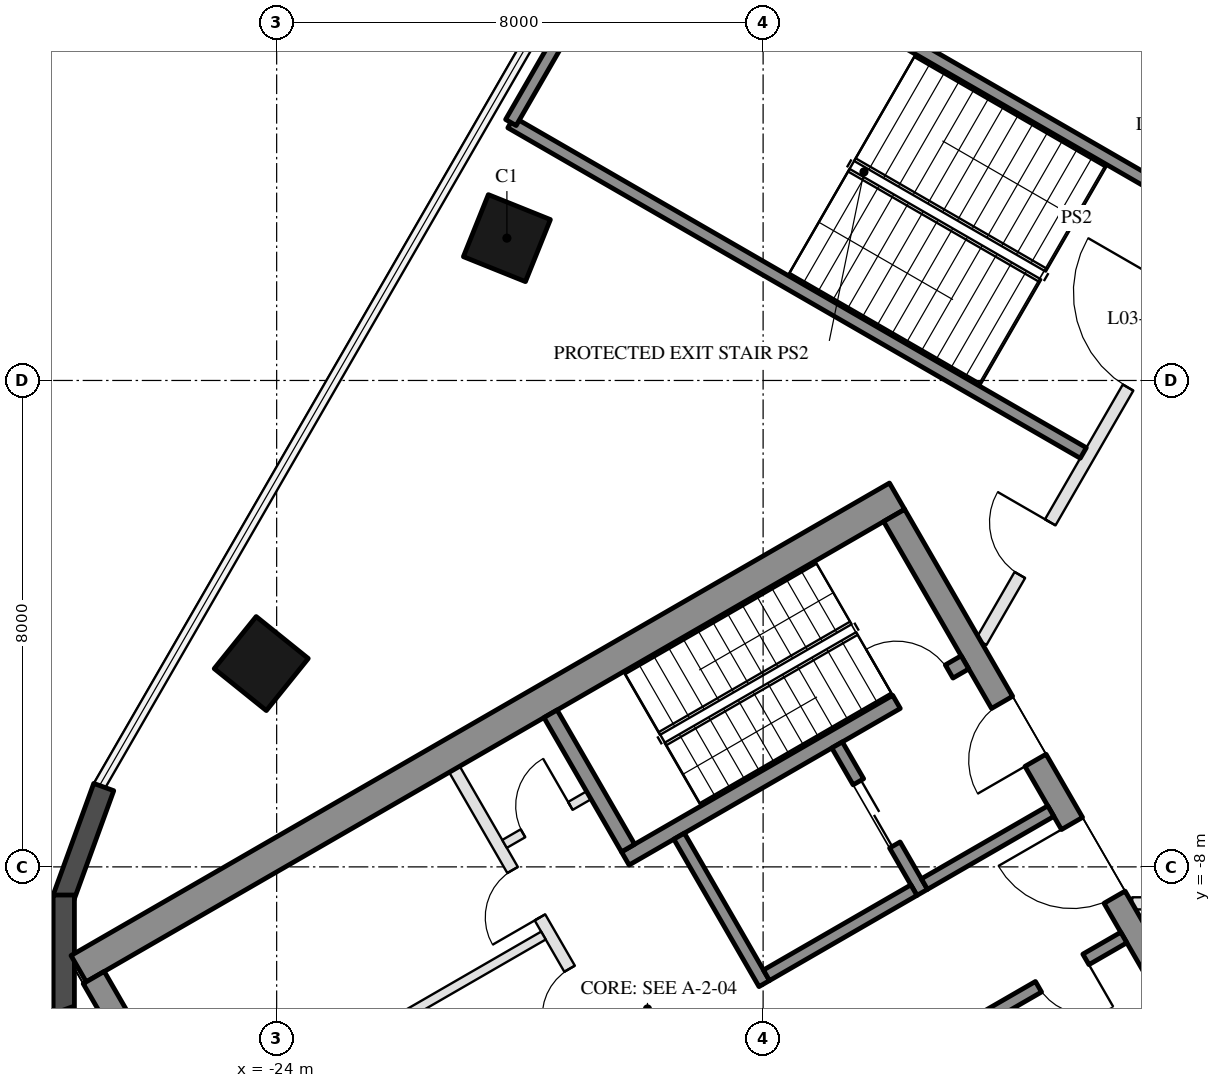
"""IFC4 building model, lengths in metres.
Left out: names, types, materials, properties, quantities, classifications, styles, units other than length and angle.
Written with IfcOpenShell. Run it as: python <this file> out.ifc"""

import sys

from ifc_helpers import new_model, si_unit, direction, frame, frame_2d, origin, origin_2d, place, context, subcontext, project, spatial, rectangle, hollow_rectangle, extrude, boolean, halfspace, element, fill, save


model = new_model("IFC4")
c1 = context("Model", 3, precision=1e-05, world=origin(), true_north=direction((0.0, 1.0)))
c2 = subcontext(c1, "Body", "Model", "MODEL_VIEW")
j1 = project(units=[si_unit("LENGTHUNIT", "METRE"), si_unit("PLANEANGLEUNIT", "RADIAN")], contexts=[c1])
p1 = place(None, origin())
s1 = spatial("IfcSite", under=j1, at=p1, CompositionType="ELEMENT")
p2 = place(p1, origin())
s2 = spatial("IfcBuilding", under=s1, at=p2, CompositionType="ELEMENT")
p3 = place(p2, frame((0.0, 0.0, 23.5)))
s3 = spatial("IfcBuildingStorey", under=s2, at=p3, CompositionType="ELEMENT", Elevation=23.5)
p4 = place(p3, frame((-20.214, 2.341, 0.0), z_axis=(0.055770669369, -0.007946345373, 0.998411983118), x_axis=(-0.499656252381, -0.865968742186, 0.021018254285)))
e1 = element("IfcColumn", 1, at=p4, inside=s3, PredefinedType="COLUMN", context=c2, shape_type="SweptSolid", body=[
    boolean("DIFFERENCE", boolean("DIFFERENCE", extrude(hollow_rectangle(XDim=1.1, YDim=1.1, WallThickness=0.05, at=origin_2d()), origin(), (0.0, 0.0, 1.0), 5.008), halfspace(frame((0.0, 0.0, 0.014), z_axis=(0.0, 0.0, 1.0), x_axis=(1.0, 0.0, 0.0)), True)), halfspace(frame((0.0, 0.0, 4.997), z_axis=(0.0, 0.0, 1.0), x_axis=(1.0, 0.0, 0.0)), False)),
])
p5 = place(p3, frame((-24.253, -4.656, 0.0), z_axis=(0.066256812747, 0.010279549625, 0.997749650776), x_axis=(-0.498832862409, -0.865677791145, 0.042044468106)))
e2 = element("IfcColumn", 2, at=p5, inside=s3, PredefinedType="COLUMN", context=c2, shape_type="SweptSolid", body=[
    boolean("DIFFERENCE", boolean("DIFFERENCE", extrude(hollow_rectangle(XDim=1.1, YDim=1.1, WallThickness=0.05, at=origin_2d()), origin(), (0.0, 0.0, 1.0), 5.011), halfspace(frame((0.0, 0.0, 0.017), z_axis=(0.0, 0.0, 1.0), x_axis=(1.0, 0.0, 0.0)), True)), halfspace(frame((0.0, 0.0, 4.999), z_axis=(0.0, 0.0, 1.0), x_axis=(1.0, 0.0, 0.0)), False)),
])
for number, where, z_axis, x_axis in (
    (3, (-26.844, -6.687, 0.0), (0.0, 0.0, 1.0), (-0.342, -0.94, 0.0)),
    (4, (-27.501, -8.463, 0.0), (0.0, 0.0, 1.0), (0.0, -1.0, 0.0)),
    (5, (-27.512, -10.357, 0.0), (0.0, 0.0, 1.0), (0.342, -0.94, 0.0)),
):
    element("IfcWall", number, at=place(p3, frame(where, z_axis=z_axis, x_axis=x_axis)), inside=s3, PredefinedType="SOLIDWALL", context=c2, shape_type="SweptSolid", body=[
        extrude(rectangle(XDim=1.954, YDim=0.35, at=frame_2d((0.977, 0.0))), origin(), (0.0, 0.0, 1.0), 4.7),
    ])
p6 = place(p3, frame((-13.797, -1.903, 0.0), z_axis=(0.0, 0.0, 1.0), x_axis=(-0.866025760136, -0.499999382781, 0.0)))
e6 = element("IfcWall", 6, at=p6, inside=s3, PredefinedType="SHEAR", context=c2, shape_type="SweptSolid", body=[
    extrude(rectangle(XDim=15.542, YDim=0.5, at=frame_2d((7.771, 0.0))), origin(), (0.0, 0.0, 1.0), 4.7),
])
p7 = place(p3, frame((-13.845, -2.22, 0.0), z_axis=(0.0, 0.0, 1.0), x_axis=(0.500004234368, -0.866022959057, 0.0)))
e7 = element("IfcWall", 7, at=p7, inside=s3, PredefinedType="SHEAR", context=c2, shape_type="SweptSolid", body=[
    extrude(rectangle(XDim=10.0, YDim=0.4, at=frame_2d((5.0, 0.0))), origin(), (0.0, 0.0, 1.0), 4.7),
])
p8 = place(p7, frame((3.55, 0.0, 0.0)))
e8 = element("IfcOpeningElement", 8, at=p8, cuts=e7, PredefinedType="OPENING", context=c2, shape_type="SweptSolid", body=[
    extrude(rectangle(XDim=1.1, YDim=2.1, at=frame_2d((0.55, 1.05))), frame((0.0, 0.21, 0.0), z_axis=(0.0, -1.0, 0.0), x_axis=(1.0, 0.0, 0.0)), (0.0, 0.0, 1.0), 0.42),
])
p9 = place(p7, frame((5.85, 0.0, 0.0)))
e9 = element("IfcOpeningElement", 9, at=p9, cuts=e7, PredefinedType="OPENING", context=c2, shape_type="SweptSolid", body=[
    extrude(rectangle(XDim=1.4, YDim=2.1, at=frame_2d((0.7, 1.05))), frame((0.0, 0.21, 0.0), z_axis=(0.0, -1.0, 0.0), x_axis=(1.0, 0.0, 0.0)), (0.0, 0.0, 1.0), 0.42),
])
p10 = place(p3, frame((-27.009, -9.82, 0.0), z_axis=(0.0, 0.0, 1.0), x_axis=(0.499977295307, -0.866038511948, 0.0)))
e10 = element("IfcWall", 10, at=p10, inside=s3, PredefinedType="SHEAR", context=c2, shape_type="SweptSolid", body=[
    extrude(rectangle(XDim=3.4, YDim=0.4, at=frame_2d((1.7, 0.0))), origin(), (0.0, 0.0, 1.0), 4.7),
])
p11 = place(p3, frame((-12.681, -4.636, 0.0), z_axis=(0.0, 0.0, 1.0), x_axis=(-0.866021702275, -0.500006411147, 0.0)))
e11 = element("IfcWall", 11, at=p11, inside=s3, PredefinedType="SHEAR", context=c2, shape_type="SweptSolid", body=[
    extrude(rectangle(XDim=6.45, YDim=0.25, at=frame_2d((3.225, 0.0))), origin(), (0.0, 0.0, 1.0), 4.7),
])
p12 = place(p11, frame((0.3, 0.0, 0.0)))
e12 = element("IfcOpeningElement", 12, at=p12, cuts=e11, PredefinedType="OPENING", context=c2, shape_type="SweptSolid", body=[
    extrude(rectangle(XDim=1.0, YDim=2.1, at=frame_2d((0.5, 1.05))), frame((0.0, 0.135, 0.0), z_axis=(0.0, -1.0, 0.0), x_axis=(1.0, 0.0, 0.0)), (0.0, 0.0, 1.0), 0.27),
])
p13 = place(p3, frame((-19.496, -5.482, 0.0), z_axis=(0.0, 0.0, 1.0), x_axis=(0.499990435942, -0.866030925526, 0.0)))
e13 = element("IfcWall", 13, at=p13, inside=s3, PredefinedType="SHEAR", context=c2, shape_type="SweptSolid", body=[
    extrude(rectangle(XDim=2.55, YDim=0.25, at=frame_2d((1.275, 0.0))), origin(), (0.0, 0.0, 1.0), 4.7),
])
p14 = place(p3, frame((-17.381, -7.495, 0.0), z_axis=(0.0, 0.0, 1.0), x_axis=(0.500011755427, -0.866018616679, 0.0)))
e14 = element("IfcWall", 14, at=p14, inside=s3, PredefinedType="SHEAR", context=c2, shape_type="SweptSolid", body=[
    extrude(rectangle(XDim=2.8, YDim=0.2, at=frame_2d((1.4, 0.0))), origin(), (0.0, 0.0, 1.0), 4.7),
])
p15 = place(p3, frame((-14.783, -5.995, 0.0), z_axis=(0.0, 0.0, 1.0), x_axis=(0.49994636267, -0.866056369097, 0.0)))
e15 = element("IfcWall", 15, at=p15, inside=s3, PredefinedType="SHEAR", context=c2, shape_type="SweptSolid", body=[
    extrude(rectangle(XDim=2.8, YDim=0.2, at=frame_2d((1.4, 0.0))), origin(), (0.0, 0.0, 1.0), 4.7),
])
p16 = place(p15, frame((0.7, 0.0, 0.0)))
e16 = element("IfcOpeningElement", 16, at=p16, cuts=e15, PredefinedType="OPENING", context=c2, shape_type="SweptSolid", body=[
    extrude(rectangle(XDim=1.2, YDim=2.1, at=frame_2d((0.6, 1.05))), frame((0.0, 0.11, 0.0), z_axis=(0.0, -1.0, 0.0), x_axis=(1.0, 0.0, 0.0)), (0.0, 0.0, 1.0), 0.22),
])
p17 = place(p3, frame((-13.52, -8.383, 0.0), z_axis=(0.0, 0.0, 1.0), x_axis=(-0.866034573852, -0.49998411664, 0.0)))
e17 = element("IfcWall", 17, at=p17, inside=s3, PredefinedType="SHEAR", context=c2, shape_type="SweptSolid", body=[
    extrude(rectangle(XDim=2.8, YDim=0.2, at=frame_2d((1.4, 0.0))), origin(), (0.0, 0.0, 1.0), 4.7),
])
p18 = place(p3, frame((-11.268, -7.083, 0.0), z_axis=(0.0, 0.0, 1.0), x_axis=(-0.866050077142, -0.499957262057, 0.0)))
e18 = element("IfcWall", 18, at=p18, inside=s3, PredefinedType="SHEAR", context=c2, shape_type="SweptSolid", body=[
    extrude(rectangle(XDim=2.4, YDim=0.2, at=frame_2d((1.2, 0.0))), origin(), (0.0, 0.0, 1.0), 4.7),
])
p19 = place(p3, frame((-10.068, -9.162, 0.0), z_axis=(0.0, 0.0, 1.0), x_axis=(-0.866032725843, -0.499987317609, 0.0)))
e19 = element("IfcWall", 19, at=p19, inside=s3, PredefinedType="SHEAR", context=c2, shape_type="SweptSolid", body=[
    extrude(rectangle(XDim=10.16, YDim=0.2, at=frame_2d((5.08, 0.0))), origin(), (0.0, 0.0, 1.0), 4.7),
])
p20 = place(p19, frame((0.72, 0.0, 0.0)))
e20 = element("IfcOpeningElement", 20, at=p20, cuts=e19, PredefinedType="OPENING", context=c2, shape_type="SweptSolid", body=[
    extrude(rectangle(XDim=0.9, YDim=2.1, at=frame_2d((0.45, 1.05))), frame((0.0, 0.11, 0.0), z_axis=(0.0, -1.0, 0.0), x_axis=(1.0, 0.0, 0.0)), (0.0, 0.0, 1.0), 0.22),
])
p21 = place(p19, frame((5.8, 0.0, 0.0)))
e21 = element("IfcOpeningElement", 21, at=p21, cuts=e19, PredefinedType="OPENING", context=c2, shape_type="SweptSolid", body=[
    extrude(rectangle(XDim=0.9, YDim=2.1, at=frame_2d((0.45, 1.05))), frame((0.0, 0.11, 0.0), z_axis=(0.0, -1.0, 0.0), x_axis=(1.0, 0.0, 0.0)), (0.0, 0.0, 1.0), 0.22),
])
p22 = place(p3, frame((-21.076, -6.395, 0.0), z_axis=(0.0, 0.0, 1.0), x_axis=(0.50001468107, -0.866016927499, 0.0)))
e22 = element("IfcWall", 22, at=p22, inside=s3, PredefinedType="PARTITIONING", context=c2, shape_type="SweptSolid", body=[
    extrude(rectangle(XDim=5.4, YDim=0.2, at=frame_2d((2.7, 0.0))), origin(), (0.0, 0.0, 1.0), 4.7),
])
p23 = place(p22, frame((1.913, 0.0, 0.0)))
e23 = element("IfcOpeningElement", 23, at=p23, cuts=e22, PredefinedType="OPENING", context=c2, shape_type="SweptSolid", body=[
    extrude(rectangle(XDim=0.9, YDim=2.1, at=frame_2d((0.45, 1.05))), frame((0.0, 0.11, 0.0), z_axis=(0.0, -1.0, 0.0), x_axis=(1.0, 0.0, 0.0)), (0.0, 0.0, 1.0), 0.22),
])
p24 = place(p22, frame((3.788, 0.0, 0.0)))
e24 = element("IfcOpeningElement", 24, at=p24, cuts=e22, PredefinedType="OPENING", context=c2, shape_type="SweptSolid", body=[
    extrude(rectangle(XDim=0.9, YDim=2.1, at=frame_2d((0.45, 1.05))), frame((0.0, 0.11, 0.0), z_axis=(0.0, -1.0, 0.0), x_axis=(1.0, 0.0, 0.0)), (0.0, 0.0, 1.0), 0.22),
])
p25 = place(p3, frame((-18.866, -6.822, 0.0), z_axis=(0.0, 0.0, 1.0), x_axis=(-0.866028054938, -0.499995408039, 0.0)))
e25 = element("IfcWall", 25, at=p25, inside=s3, PredefinedType="PARTITIONING", context=c2, shape_type="SweptSolid", body=[
    extrude(rectangle(XDim=1.6, YDim=0.15, at=frame_2d((0.8, 0.0))), origin(), (0.0, 0.0, 1.0), 4.7),
])
p26 = place(p25, frame((0.35, 0.0, 0.0)))
e26 = element("IfcOpeningElement", 26, at=p26, cuts=e25, PredefinedType="OPENING", context=c2, shape_type="SweptSolid", body=[
    extrude(rectangle(XDim=0.9, YDim=2.1, at=frame_2d((0.45, 1.05))), frame((0.0, 0.085, 0.0), z_axis=(0.0, -1.0, 0.0), x_axis=(1.0, 0.0, 0.0)), (0.0, 0.0, 1.0), 0.17),
])
p27 = place(p3, frame((-19.613, -9.13, 0.0), z_axis=(0.0, 0.0, 1.0), x_axis=(-0.866037242061, -0.499979494943, 0.0)))
e27 = element("IfcWall", 27, at=p27, inside=s3, PredefinedType="PARTITIONING", context=c2, shape_type="SweptSolid", body=[
    extrude(rectangle(XDim=6.55, YDim=0.15, at=frame_2d((3.275, 0.0))), origin(), (0.0, 0.0, 1.0), 4.7),
])
p28 = place(p3, frame((-9.93, -8.6, 0.0), z_axis=(0.0, 0.0, 1.0), x_axis=(1.0, 0.0, 0.0)))
e28 = element("IfcWall", 28, at=p28, inside=s3, PredefinedType="PARTITIONING", context=c2, shape_type="SweptSolid", body=[
    extrude(rectangle(XDim=19.861, YDim=0.2, at=frame_2d((9.93, 0.0))), origin(), (0.0, 0.0, 1.0), 3.91),
])
p29 = place(p28, frame((1.734, 0.0, 0.0)))
e29 = element("IfcOpeningElement", 29, at=p29, cuts=e28, PredefinedType="OPENING", context=c2, shape_type="SweptSolid", body=[
    extrude(rectangle(XDim=1.0, YDim=2.1, at=frame_2d((0.5, 1.05))), frame((0.0, 0.11, 0.0), z_axis=(0.0, -1.0, 0.0), x_axis=(1.0, 0.0, 0.0)), (0.0, 0.0, 1.0), 0.22),
])
p30 = place(p28, frame((6.081, 0.0, 0.0)))
e30 = element("IfcOpeningElement", 30, at=p30, cuts=e28, PredefinedType="OPENING", context=c2, shape_type="SweptSolid", body=[
    extrude(rectangle(XDim=1.0, YDim=2.1, at=frame_2d((0.5, 1.05))), frame((0.0, 0.11, 0.0), z_axis=(0.0, -1.0, 0.0), x_axis=(1.0, 0.0, 0.0)), (0.0, 0.0, 1.0), 0.22),
])
p31 = place(p28, frame((10.831, 0.0, 0.0)))
e31 = element("IfcOpeningElement", 31, at=p31, cuts=e28, PredefinedType="OPENING", context=c2, shape_type="SweptSolid", body=[
    extrude(rectangle(XDim=1.0, YDim=2.1, at=frame_2d((0.5, 1.05))), frame((0.0, 0.11, 0.0), z_axis=(0.0, -1.0, 0.0), x_axis=(1.0, 0.0, 0.0)), (0.0, 0.0, 1.0), 0.22),
])
p32 = place(p28, frame((16.278, 0.0, 0.0)))
e32 = element("IfcOpeningElement", 32, at=p32, cuts=e28, PredefinedType="OPENING", context=c2, shape_type="SweptSolid", body=[
    extrude(rectangle(XDim=1.2, YDim=2.1, at=frame_2d((0.6, 1.05))), frame((0.0, 0.11, 0.0), z_axis=(0.0, -1.0, 0.0), x_axis=(1.0, 0.0, 0.0)), (0.0, 0.0, 1.0), 0.22),
])
p33 = place(p3, frame((-16.738, 10.761, 0.0), z_axis=(0.0, 0.0, 1.0), x_axis=(0.866020428917, -0.500008616625, 0.0)))
e33 = element("IfcWall", 33, at=p33, inside=s3, PredefinedType="PARTITIONING", context=c2, shape_type="SweptSolid", body=[
    extrude(rectangle(XDim=11.176, YDim=0.15, at=frame_2d((5.588, 0.0))), origin(), (0.0, 0.0, 1.0), 4.1),
])
p34 = place(p3, frame((-17.948, 8.053, 0.0), z_axis=(0.0, 0.0, 1.0), x_axis=(0.86602026553, -0.500008899612, 0.0)))
e34 = element("IfcWall", 34, at=p34, inside=s3, PredefinedType="SOLIDWALL", context=c2, shape_type="SweptSolid", body=[
    extrude(rectangle(XDim=10.87, YDim=0.2, at=frame_2d((5.435, 0.0))), origin(), (0.0, 0.0, 1.0), 4.7),
])
p35 = place(p3, frame((-20.148, 4.242, 0.0), z_axis=(0.0, 0.0, 1.0), x_axis=(0.866025880615, -0.499999174104, 0.0)))
e35 = element("IfcWall", 35, at=p35, inside=s3, PredefinedType="SOLIDWALL", context=c2, shape_type="SweptSolid", body=[
    extrude(rectangle(XDim=10.87, YDim=0.2, at=frame_2d((5.435, 0.0))), origin(), (0.0, 0.0, 1.0), 4.7),
])
p36 = place(p3, frame((-2.482, 12.9, 0.0), z_axis=(0.0, 0.0, 1.0), x_axis=(-0.50000478328, -0.866022642139, 0.0)))
e36 = element("IfcWall", 36, at=p36, inside=s3, PredefinedType="PARTITIONING", context=c2, shape_type="SweptSolid", body=[
    extrude(rectangle(XDim=19.861, YDim=0.2, at=frame_2d((9.931, 0.0))), origin(), (0.0, 0.0, 1.0), 3.91),
])
p37 = place(p36, frame((13.23, 0.0, 0.0)))
e37 = element("IfcOpeningElement", 37, at=p37, cuts=e36, PredefinedType="OPENING", context=c2, shape_type="SweptSolid", body=[
    extrude(rectangle(XDim=1.8, YDim=2.1, at=frame_2d((0.9, 1.05))), frame((0.0, 0.11, 0.0), z_axis=(0.0, -1.0, 0.0), x_axis=(1.0, 0.0, 0.0)), (0.0, 0.0, 1.0), 0.22),
])
p38 = place(p36, frame((2.234, 0.0, 0.0)))
e38 = element("IfcOpeningElement", 38, at=p38, cuts=e36, PredefinedType="OPENING", context=c2, shape_type="SweptSolid", body=[
    extrude(rectangle(XDim=1.0, YDim=2.1, at=frame_2d((0.5, 1.05))), frame((0.0, 0.11, 0.0), z_axis=(0.0, -1.0, 0.0), x_axis=(1.0, 0.0, 0.0)), (0.0, 0.0, 1.0), 0.22),
])
p39 = place(p36, frame((6.706, 0.0, 0.0)))
e39 = element("IfcOpeningElement", 39, at=p39, cuts=e36, PredefinedType="OPENING", context=c2, shape_type="SweptSolid", body=[
    extrude(rectangle(XDim=1.0, YDim=2.1, at=frame_2d((0.5, 1.05))), frame((0.0, 0.11, 0.0), z_axis=(0.0, -1.0, 0.0), x_axis=(1.0, 0.0, 0.0)), (0.0, 0.0, 1.0), 0.22),
])
p40 = place(p36, frame((9.943, 0.0, 0.0)))
e40 = element("IfcOpeningElement", 40, at=p40, cuts=e36, PredefinedType="OPENING", context=c2, shape_type="SweptSolid", body=[
    extrude(rectangle(XDim=1.0, YDim=2.1, at=frame_2d((0.5, 1.05))), frame((0.0, 0.11, 0.0), z_axis=(0.0, -1.0, 0.0), x_axis=(1.0, 0.0, 0.0)), (0.0, 0.0, 1.0), 0.22),
])
p41 = place(p36, frame((17.59, 0.0, 0.0)))
e41 = element("IfcOpeningElement", 41, at=p41, cuts=e36, PredefinedType="OPENING", context=c2, shape_type="SweptSolid", body=[
    extrude(rectangle(XDim=1.0, YDim=2.1, at=frame_2d((0.5, 1.05))), frame((0.0, 0.11, 0.0), z_axis=(0.0, -1.0, 0.0), x_axis=(1.0, 0.0, 0.0)), (0.0, 0.0, 1.0), 0.22),
])
p42 = place(p3, frame((-17.948, 8.053, 0.0), z_axis=(0.0, 0.0, 1.0), x_axis=(-0.50002983664, -0.866008176907, 0.0)))
e42 = element("IfcWall", 42, at=p42, inside=s3, PredefinedType="SOLIDWALL", context=c2, shape_type="SweptSolid", body=[
    extrude(rectangle(XDim=4.4, YDim=0.2, at=frame_2d((2.2, 0.0))), origin(), (0.0, 0.0, 1.0), 4.7),
])
p43 = place(p16, origin())
e43 = element("IfcDoor", 43, at=p43, inside=s3, OperationType="DOUBLE_DOOR_SLIDING", PredefinedType="DOOR", context=c2, shape_type="SweptSolid", body=[
    extrude(rectangle(XDim=1.2, YDim=2.1, at=frame_2d((0.6, 1.05))), frame((0.0, 0.025, 0.0), z_axis=(0.0, -1.0, 0.0), x_axis=(1.0, 0.0, 0.0)), (0.0, 0.0, 1.0), 0.05),
])
fill(e16, e43)
p44 = place(p26, frame((0.9, 0.0, 0.0), z_axis=(0.0, 0.0, 1.0), x_axis=(-1.0, 0.0, 0.0)))
e44 = element("IfcDoor", 44, at=p44, inside=s3, OperationType="SINGLE_SWING_RIGHT", PredefinedType="DOOR", context=c2, shape_type="SweptSolid", body=[
    extrude(rectangle(XDim=0.9, YDim=2.1, at=frame_2d((0.45, 1.05))), frame((0.0, 0.025, 0.0), z_axis=(0.0, -1.0, 0.0), x_axis=(1.0, 0.0, 0.0)), (0.0, 0.0, 1.0), 0.05),
])
fill(e26, e44)
p45 = place(p20, origin())
e45 = element("IfcDoor", 45, at=p45, inside=s3, OperationType="SINGLE_SWING_LEFT", PredefinedType="DOOR", context=c2, shape_type="SweptSolid", body=[
    extrude(rectangle(XDim=0.9, YDim=2.1, at=frame_2d((0.45, 1.05))), frame((0.0, 0.025, 0.0), z_axis=(0.0, -1.0, 0.0), x_axis=(1.0, 0.0, 0.0)), (0.0, 0.0, 1.0), 0.05),
])
fill(e20, e45)
p46 = place(p23, frame((0.9, 0.0, 0.0), z_axis=(0.0, 0.0, 1.0), x_axis=(-1.0, 0.0, 0.0)))
e46 = element("IfcDoor", 46, at=p46, inside=s3, OperationType="SINGLE_SWING_LEFT", PredefinedType="DOOR", context=c2, shape_type="SweptSolid", body=[
    extrude(rectangle(XDim=0.9, YDim=2.1, at=frame_2d((0.45, 1.05))), frame((0.0, 0.025, 0.0), z_axis=(0.0, -1.0, 0.0), x_axis=(1.0, 0.0, 0.0)), (0.0, 0.0, 1.0), 0.05),
])
fill(e23, e46)
p47 = place(p24, frame((0.9, 0.0, 0.0), z_axis=(0.0, 0.0, 1.0), x_axis=(-1.0, 0.0, 0.0)))
e47 = element("IfcDoor", 47, at=p47, inside=s3, OperationType="SINGLE_SWING_LEFT", PredefinedType="DOOR", context=c2, shape_type="SweptSolid", body=[
    extrude(rectangle(XDim=0.9, YDim=2.1, at=frame_2d((0.45, 1.05))), frame((0.0, 0.025, 0.0), z_axis=(0.0, -1.0, 0.0), x_axis=(1.0, 0.0, 0.0)), (0.0, 0.0, 1.0), 0.05),
])
fill(e24, e47)
p48 = place(p8, frame((1.1, 0.0, 0.0), z_axis=(0.0, 0.0, 1.0), x_axis=(-1.0, 0.0, 0.0)))
e48 = element("IfcDoor", 48, at=p48, inside=s3, OperationType="SINGLE_SWING_LEFT", PredefinedType="DOOR", context=c2, shape_type="SweptSolid", body=[
    extrude(rectangle(XDim=1.1, YDim=2.1, at=frame_2d((0.55, 1.05))), frame((0.0, 0.025, 0.0), z_axis=(0.0, -1.0, 0.0), x_axis=(1.0, 0.0, 0.0)), (0.0, 0.0, 1.0), 0.05),
])
fill(e8, e48)
p49 = place(p9, frame((1.4, 0.0, 0.0), z_axis=(0.0, 0.0, 1.0), x_axis=(-1.0, 0.0, 0.0)))
e49 = element("IfcDoor", 49, at=p49, inside=s3, OperationType="DOUBLE_DOOR_SINGLE_SWING", PredefinedType="DOOR", context=c2, shape_type="SweptSolid", body=[
    extrude(rectangle(XDim=1.4, YDim=2.1, at=frame_2d((0.7, 1.05))), frame((0.0, 0.025, 0.0), z_axis=(0.0, -1.0, 0.0), x_axis=(1.0, 0.0, 0.0)), (0.0, 0.0, 1.0), 0.05),
])
fill(e9, e49)
p50 = place(p12, frame((1.0, 0.0, 0.0), z_axis=(0.0, 0.0, 1.0), x_axis=(-1.0, 0.0, 0.0)))
e50 = element("IfcDoor", 50, at=p50, inside=s3, OperationType="SINGLE_SWING_LEFT", PredefinedType="DOOR", context=c2, shape_type="SweptSolid", body=[
    extrude(rectangle(XDim=1.0, YDim=2.1, at=frame_2d((0.5, 1.05))), frame((0.0, 0.025, 0.0), z_axis=(0.0, -1.0, 0.0), x_axis=(1.0, 0.0, 0.0)), (0.0, 0.0, 1.0), 0.05),
])
fill(e12, e50)
p51 = place(p37, frame((1.8, 0.0, 0.0), z_axis=(0.0, 0.0, 1.0), x_axis=(-1.0, 0.0, 0.0)))
e51 = element("IfcDoor", 51, at=p51, inside=s3, OperationType="DOUBLE_DOOR_SINGLE_SWING", PredefinedType="DOOR", context=c2, shape_type="SweptSolid", body=[
    extrude(rectangle(XDim=1.8, YDim=2.1, at=frame_2d((0.9, 1.05))), frame((0.0, 0.025, 0.0), z_axis=(0.0, -1.0, 0.0), x_axis=(1.0, 0.0, 0.0)), (0.0, 0.0, 1.0), 0.05),
])
fill(e37, e51)
p52 = place(p41, frame((1.0, 0.0, 0.0), z_axis=(0.0, 0.0, 1.0), x_axis=(-1.0, 0.0, 0.0)))
e52 = element("IfcDoor", 52, at=p52, inside=s3, OperationType="SINGLE_SWING_RIGHT", PredefinedType="DOOR", context=c2, shape_type="SweptSolid", body=[
    extrude(rectangle(XDim=1.0, YDim=2.1, at=frame_2d((0.5, 1.05))), frame((0.0, 0.025, 0.0), z_axis=(0.0, -1.0, 0.0), x_axis=(1.0, 0.0, 0.0)), (0.0, 0.0, 1.0), 0.05),
])
fill(e41, e52)
save(model, sys.argv[1])
